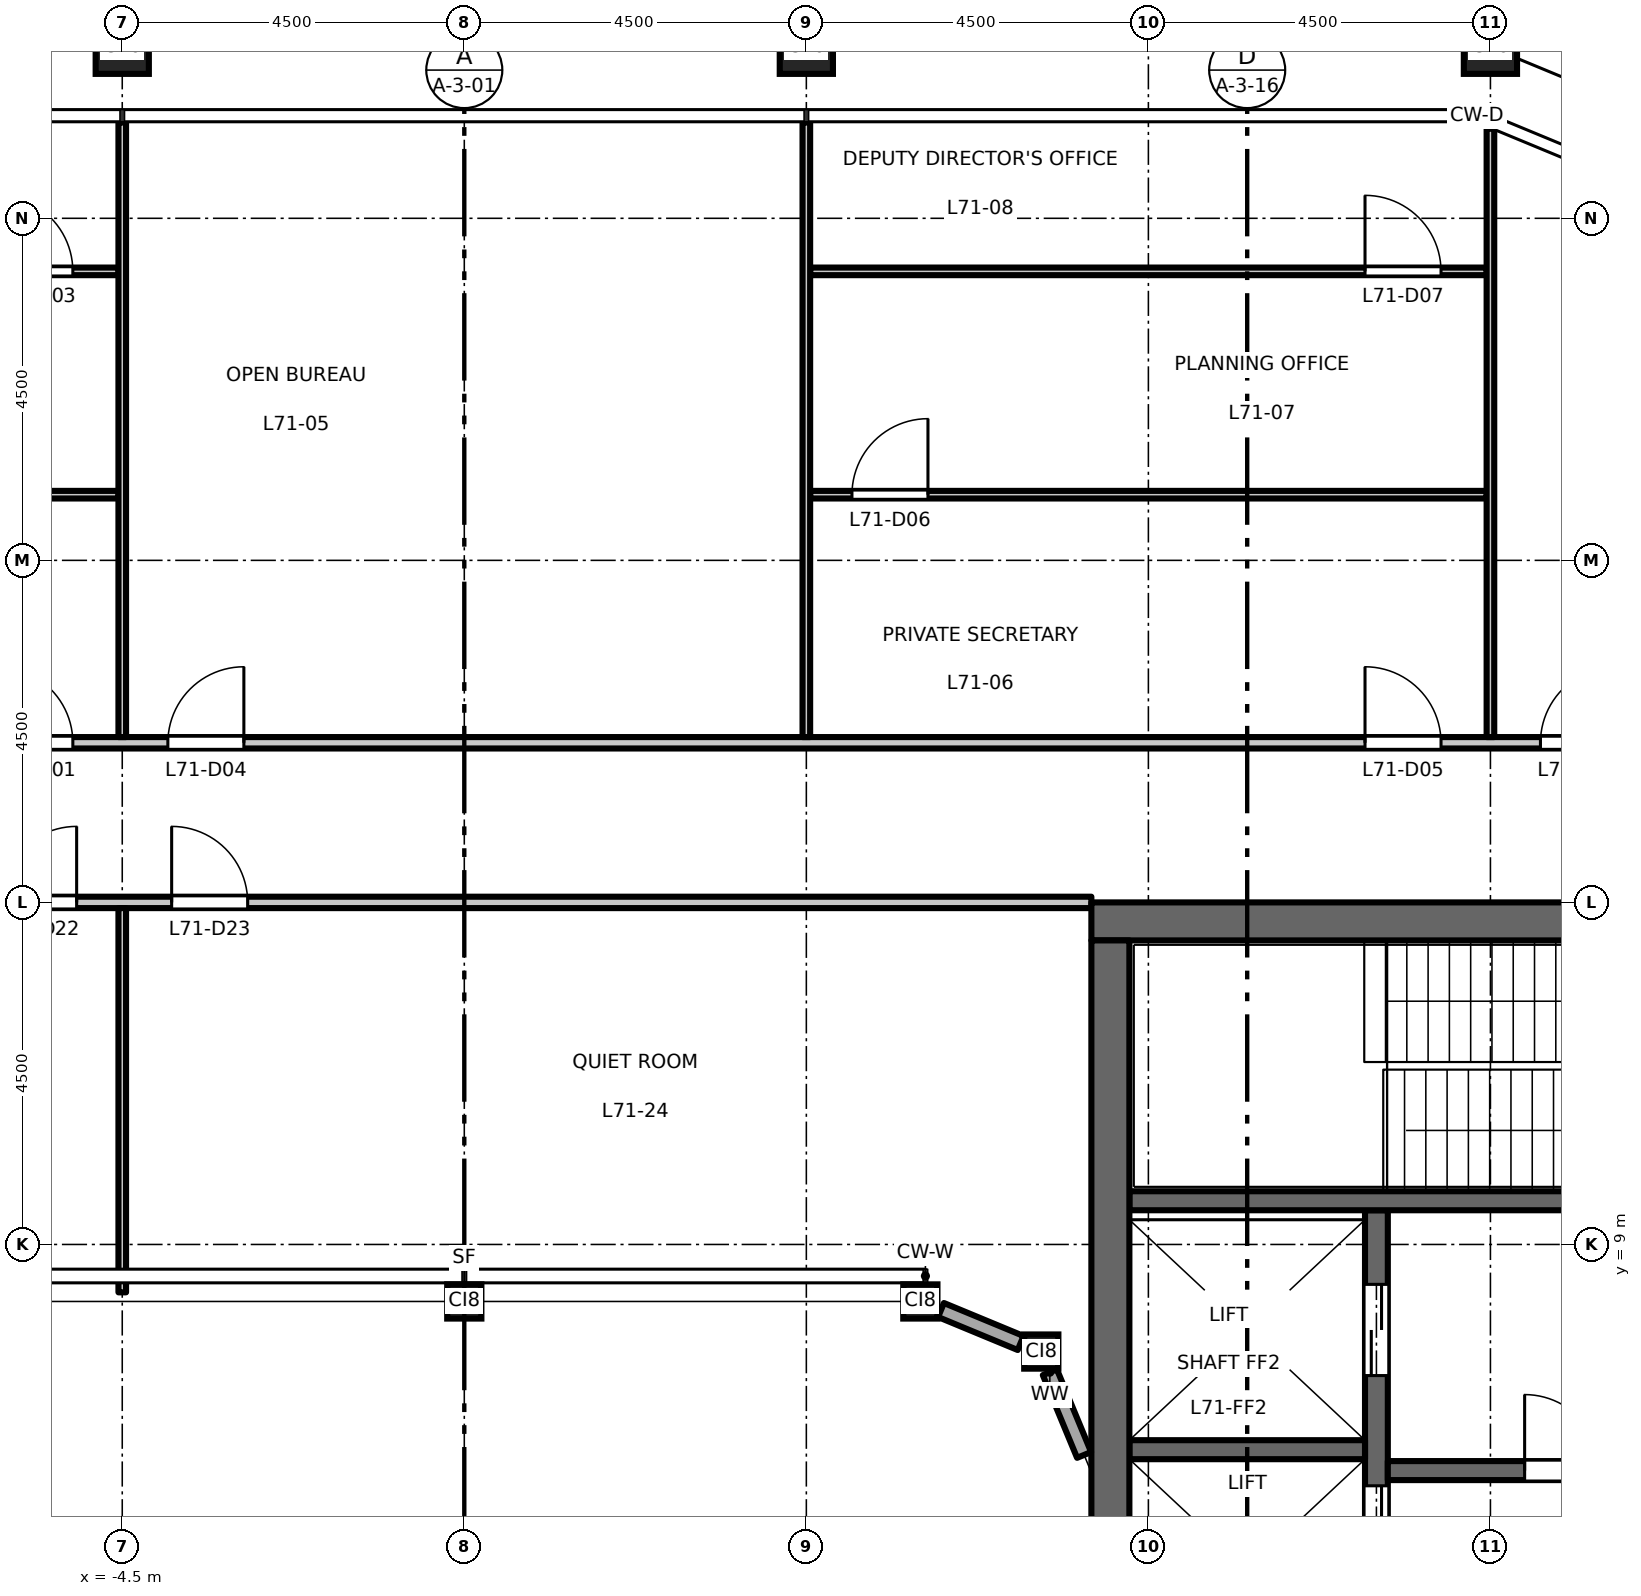
"""IFC4 building model, lengths in metres.
Left out: names, types, materials, properties, quantities, classifications, styles, units other than length and angle.
Written with IfcOpenShell. Run it as: python <this file> out.ifc"""

import sys

from ifc_helpers import new_model, si_unit, direction, frame, frame_2d, origin, origin_2d, place, context, subcontext, project, spatial, rectangle, hollow_rectangle, extrude, element, fill, save


model = new_model("IFC4")
c1 = context("Model", 3, precision=1e-05, world=origin(), true_north=direction((0.0, 1.0)))
c2 = subcontext(c1, "Body", "Model", "MODEL_VIEW")
j1 = project(units=[si_unit("LENGTHUNIT", "METRE"), si_unit("PLANEANGLEUNIT", "RADIAN")], contexts=[c1])
p1 = place(None, origin())
s1 = spatial("IfcSite", under=j1, at=p1, CompositionType="ELEMENT")
p2 = place(p1, origin())
s2 = spatial("IfcBuilding", under=s1, at=p2, CompositionType="ELEMENT")
p3 = place(p2, frame((0.0, 0.0, 330.2)))
s3 = spatial("IfcBuildingStorey", under=s2, at=p3, CompositionType="ELEMENT", Elevation=330.2)
for number, where, z_axis, x_axis in (
    (1, (13.5, 24.75, 0.0), (0.0, 0.0, 1.0), (1.0, 0.0, 0.0)),
    (2, (4.5, 24.75, 0.0), (0.0, 0.0, 1.0), (1.0, 0.0, 0.0)),
    (3, (-4.5, 24.75, 0.0), (0.0, 0.0, 1.0), (1.0, 0.0, 0.0)),
):
    element("IfcColumn", number, at=place(p3, frame(where, z_axis=z_axis, x_axis=x_axis)), inside=s3, PredefinedType="COLUMN", context=c2, shape_type="SweptSolid", body=[
        extrude(hollow_rectangle(XDim=0.7, YDim=0.7, WallThickness=0.036, at=origin_2d()), origin(), (0.0, 0.0, 1.0), 4.5),
    ])
for number, where, z_axis, x_axis in (
    (4, (0.0, 8.25, 0.0), (0.0, 0.0, 1.0), (1.0, 0.0, 0.0)),
    (5, (6.0, 8.25, 0.0), (0.0, 0.0, 1.0), (1.0, 0.0, 0.0)),
    (6, (7.591, 7.591, 0.0), (0.0, 0.0, 1.0), (1.0, 0.0, 0.0)),
):
    element("IfcColumn", number, at=place(p3, frame(where, z_axis=z_axis, x_axis=x_axis)), inside=s3, PredefinedType="COLUMN", context=c2, shape_type="SweptSolid", body=[
        extrude(hollow_rectangle(XDim=0.45, YDim=0.45, WallThickness=0.022, at=origin_2d()), origin(), (0.0, 0.0, 1.0), 4.5),
    ])
p4 = place(p3, frame((12.0, -9.45, 0.0), z_axis=(0.0, 0.0, 1.0), x_axis=(0.0, 1.0, 0.0)))
e7 = element("IfcWall", 7, at=p4, inside=s3, PredefinedType="SHEAR", context=c2, shape_type="SweptSolid", body=[
    extrude(rectangle(XDim=18.9, YDim=0.3, at=frame_2d((9.45, 0.0))), origin(), (0.0, 0.0, 1.0), 4.35),
])
p5 = place(p4, frame((4.725, 0.0, 0.0)))
e8 = element("IfcOpeningElement", 8, at=p5, cuts=e7, PredefinedType="OPENING", context=c2, shape_type="SweptSolid", body=[
    extrude(rectangle(XDim=1.1, YDim=2.1, at=frame_2d((0.55, 1.05))), frame((0.0, 0.16, 0.0), z_axis=(0.0, -1.0, 0.0), x_axis=(1.0, 0.0, 0.0)), (0.0, 0.0, 1.0), 0.32),
])
p6 = place(p4, frame((7.875, 0.0, 0.0)))
e9 = element("IfcOpeningElement", 9, at=p6, cuts=e7, PredefinedType="OPENING", context=c2, shape_type="SweptSolid", body=[
    extrude(rectangle(XDim=1.1, YDim=2.1, at=frame_2d((0.55, 1.05))), frame((0.0, 0.16, 0.0), z_axis=(0.0, -1.0, 0.0), x_axis=(1.0, 0.0, 0.0)), (0.0, 0.0, 1.0), 0.32),
])
p7 = place(p4, frame((11.025, 0.0, 0.0)))
e10 = element("IfcOpeningElement", 10, at=p7, cuts=e7, PredefinedType="OPENING", context=c2, shape_type="SweptSolid", body=[
    extrude(rectangle(XDim=1.1, YDim=2.1, at=frame_2d((0.55, 1.05))), frame((0.0, 0.16, 0.0), z_axis=(0.0, -1.0, 0.0), x_axis=(1.0, 0.0, 0.0)), (0.0, 0.0, 1.0), 0.32),
])
p8 = place(p4, frame((14.175, 0.0, 0.0)))
e11 = element("IfcOpeningElement", 11, at=p8, cuts=e7, PredefinedType="OPENING", context=c2, shape_type="SweptSolid", body=[
    extrude(rectangle(XDim=1.1, YDim=2.1, at=frame_2d((0.55, 1.05))), frame((0.0, 0.16, 0.0), z_axis=(0.0, -1.0, 0.0), x_axis=(1.0, 0.0, 0.0)), (0.0, 0.0, 1.0), 0.32),
])
p9 = place(p4, frame((16.725, 0.0, 0.0)))
e12 = element("IfcOpeningElement", 12, at=p9, cuts=e7, PredefinedType="OPENING", context=c2, shape_type="SweptSolid", body=[
    extrude(rectangle(XDim=1.2, YDim=2.1, at=frame_2d((0.6, 1.05))), frame((0.0, 0.16, 0.0), z_axis=(0.0, -1.0, 0.0), x_axis=(1.0, 0.0, 0.0)), (0.0, 0.0, 1.0), 0.32),
])
p10 = place(p4, frame((0.975, 0.0, 0.0)))
e13 = element("IfcOpeningElement", 13, at=p10, cuts=e7, PredefinedType="OPENING", context=c2, shape_type="SweptSolid", body=[
    extrude(rectangle(XDim=1.2, YDim=2.1, at=frame_2d((0.6, 1.05))), frame((0.0, 0.16, 0.0), z_axis=(0.0, -1.0, 0.0), x_axis=(1.0, 0.0, 0.0)), (0.0, 0.0, 1.0), 0.32),
])
p11 = place(p3, frame((12.15, 6.025, 0.0), z_axis=(0.0, 0.0, 1.0), x_axis=(1.0, 0.0, 0.0)))
e14 = element("IfcWall", 14, at=p11, inside=s3, PredefinedType="SHEAR", context=c2, shape_type="SweptSolid", body=[
    extrude(rectangle(XDim=4.6, YDim=0.25, at=frame_2d((2.3, 0.0))), origin(), (0.0, 0.0, 1.0), 4.35),
])
p12 = place(p11, frame((1.8, 0.0, 0.0)))
e15 = element("IfcOpeningElement", 15, at=p12, cuts=e14, PredefinedType="OPENING", context=c2, shape_type="SweptSolid", body=[
    extrude(rectangle(XDim=1.0, YDim=2.1, at=frame_2d((0.5, 1.05))), frame((0.0, 0.135, 0.0), z_axis=(0.0, -1.0, 0.0), x_axis=(1.0, 0.0, 0.0)), (0.0, 0.0, 1.0), 0.27),
])
p13 = place(p3, frame((8.75, 6.3, 0.0), z_axis=(0.0, 0.0, 1.0), x_axis=(1.0, 0.0, 0.0)))
e16 = element("IfcWall", 16, at=p13, inside=s3, PredefinedType="SHEAR", context=c2, shape_type="SweptSolid", body=[
    extrude(rectangle(XDim=3.1, YDim=0.25, at=frame_2d((1.55, 0.0))), origin(), (0.0, 0.0, 1.0), 4.35),
])
p14 = place(p3, frame((8.75, 9.575, 0.0), z_axis=(0.0, 0.0, 1.0), x_axis=(1.0, 0.0, 0.0)))
e17 = element("IfcWall", 17, at=p14, inside=s3, PredefinedType="SHEAR", context=c2, shape_type="SweptSolid", body=[
    extrude(rectangle(XDim=8.0, YDim=0.25, at=frame_2d((4.0, 0.0))), origin(), (0.0, 0.0, 1.0), 4.35),
])
p15 = place(p14, frame((6.65, 0.0, 0.0)))
e18 = element("IfcOpeningElement", 18, at=p15, cuts=e17, PredefinedType="OPENING", context=c2, shape_type="SweptSolid", body=[
    extrude(rectangle(XDim=1.1, YDim=2.1, at=frame_2d((0.55, 1.05))), frame((0.0, 0.135, 0.0), z_axis=(0.0, -1.0, 0.0), x_axis=(1.0, 0.0, 0.0)), (0.0, 0.0, 1.0), 0.27),
])
p16 = place(p3, frame((8.25, 13.25, 0.0), z_axis=(0.0, 0.0, 1.0), x_axis=(1.0, 0.0, 0.0)))
e19 = element("IfcWall", 19, at=p16, inside=s3, PredefinedType="SHEAR", context=c2, shape_type="SweptSolid", body=[
    extrude(rectangle(XDim=9.0, YDim=0.5, at=frame_2d((4.5, 0.0))), origin(), (0.0, 0.0, 1.0), 4.35),
])
p17 = place(p3, frame((8.5, -13.0, 0.0), z_axis=(0.0, 0.0, 1.0), x_axis=(0.0, 1.0, 0.0)))
e20 = element("IfcWall", 20, at=p17, inside=s3, PredefinedType="SHEAR", context=c2, shape_type="SweptSolid", body=[
    extrude(rectangle(XDim=26.0, YDim=0.5, at=frame_2d((13.0, 0.0))), origin(), (0.0, 0.0, 1.0), 4.35),
])
p18 = place(p3, frame((8.154, 6.231, 0.0), z_axis=(0.0, 0.0, 1.0), x_axis=(-0.382760542083, 0.92384758885, 0.0)))
e21 = element("IfcWall", 21, at=p18, inside=s3, PredefinedType="STANDARD", context=c2, shape_type="SweptSolid", body=[
    extrude(rectangle(XDim=1.178, YDim=0.2, at=frame_2d((0.589, 0.0))), origin(), (0.0, 0.0, 1.0), 4.01),
])
p19 = place(p3, frame((7.319, 7.703, 0.0), z_axis=(0.0, 0.0, 1.0), x_axis=(-0.923864661962, 0.382719331074, 0.0)))
e22 = element("IfcWall", 22, at=p19, inside=s3, PredefinedType="STANDARD", context=c2, shape_type="SweptSolid", body=[
    extrude(rectangle(XDim=1.134, YDim=0.2, at=frame_2d((0.567, 0.0))), origin(), (0.0, 0.0, 1.0), 4.01),
])
p20 = place(p3, frame((-8.25, 13.5, 0.0), z_axis=(0.0, 0.0, 1.0), x_axis=(1.0, 0.0, 0.0)))
e23 = element("IfcWall", 23, at=p20, inside=s3, PredefinedType="PARTITIONING", context=c2, shape_type="SweptSolid", body=[
    extrude(rectangle(XDim=16.5, YDim=0.15, at=frame_2d((8.25, 0.0))), origin(), (0.0, 0.0, 1.0), 4.35),
])
p21 = place(p20, frame((2.15, 0.0, 0.0)))
e24 = element("IfcOpeningElement", 24, at=p21, cuts=e23, PredefinedType="OPENING", context=c2, shape_type="SweptSolid", body=[
    extrude(rectangle(XDim=1.0, YDim=2.1, at=frame_2d((0.5, 1.05))), frame((0.0, 0.085, 0.0), z_axis=(0.0, -1.0, 0.0), x_axis=(1.0, 0.0, 0.0)), (0.0, 0.0, 1.0), 0.17),
])
p22 = place(p20, frame((4.4, 0.0, 0.0)))
e25 = element("IfcOpeningElement", 25, at=p22, cuts=e23, PredefinedType="OPENING", context=c2, shape_type="SweptSolid", body=[
    extrude(rectangle(XDim=1.0, YDim=2.1, at=frame_2d((0.5, 1.05))), frame((0.0, 0.085, 0.0), z_axis=(0.0, -1.0, 0.0), x_axis=(1.0, 0.0, 0.0)), (0.0, 0.0, 1.0), 0.17),
])
p23 = place(p3, frame((-22.808, 15.6, 0.0), z_axis=(0.0, 0.0, 1.0), x_axis=(1.0, 0.0, 0.0)))
e26 = element("IfcWall", 26, at=p23, inside=s3, PredefinedType="PARTITIONING", context=c2, shape_type="SweptSolid", body=[
    extrude(rectangle(XDim=45.616, YDim=0.15, at=frame_2d((22.808, 0.0))), origin(), (0.0, 0.0, 1.0), 4.35),
])
p24 = place(p23, frame((16.658, 0.0, 0.0)))
e27 = element("IfcOpeningElement", 27, at=p24, cuts=e26, PredefinedType="OPENING", context=c2, shape_type="SweptSolid", body=[
    extrude(rectangle(XDim=1.0, YDim=2.1, at=frame_2d((0.5, 1.05))), frame((0.0, 0.085, 0.0), z_axis=(0.0, -1.0, 0.0), x_axis=(1.0, 0.0, 0.0)), (0.0, 0.0, 1.0), 0.17),
])
p25 = place(p23, frame((18.908, 0.0, 0.0)))
e28 = element("IfcOpeningElement", 28, at=p25, cuts=e26, PredefinedType="OPENING", context=c2, shape_type="SweptSolid", body=[
    extrude(rectangle(XDim=1.0, YDim=2.1, at=frame_2d((0.5, 1.05))), frame((0.0, 0.085, 0.0), z_axis=(0.0, -1.0, 0.0), x_axis=(1.0, 0.0, 0.0)), (0.0, 0.0, 1.0), 0.17),
])
p26 = place(p23, frame((34.658, 0.0, 0.0)))
e29 = element("IfcOpeningElement", 29, at=p26, cuts=e26, PredefinedType="OPENING", context=c2, shape_type="SweptSolid", body=[
    extrude(rectangle(XDim=1.0, YDim=2.1, at=frame_2d((0.5, 1.05))), frame((0.0, 0.085, 0.0), z_axis=(0.0, -1.0, 0.0), x_axis=(1.0, 0.0, 0.0)), (0.0, 0.0, 1.0), 0.17),
])
p27 = place(p23, frame((7.658, 0.0, 0.0)))
e30 = element("IfcOpeningElement", 30, at=p27, cuts=e26, PredefinedType="OPENING", context=c2, shape_type="SweptSolid", body=[
    extrude(rectangle(XDim=1.0, YDim=2.1, at=frame_2d((0.5, 1.05))), frame((0.0, 0.085, 0.0), z_axis=(0.0, -1.0, 0.0), x_axis=(1.0, 0.0, 0.0)), (0.0, 0.0, 1.0), 0.17),
])
p28 = place(p23, frame((36.966, 0.0, 0.0)))
e31 = element("IfcOpeningElement", 31, at=p28, cuts=e26, PredefinedType="OPENING", context=c2, shape_type="SweptSolid", body=[
    extrude(rectangle(XDim=1.0, YDim=2.1, at=frame_2d((0.5, 1.05))), frame((0.0, 0.085, 0.0), z_axis=(0.0, -1.0, 0.0), x_axis=(1.0, 0.0, 0.0)), (0.0, 0.0, 1.0), 0.17),
])
p29 = place(p3, frame((-13.45, 18.864, 0.0), z_axis=(0.0, 0.0, 1.0), x_axis=(1.0, 0.0, 0.0)))
e32 = element("IfcWall", 32, at=p29, inside=s3, PredefinedType="PARTITIONING", context=c2, shape_type="SweptSolid", body=[
    extrude(rectangle(XDim=8.9, YDim=0.1, at=frame_2d((4.45, 0.0))), origin(), (0.0, 0.0, 1.0), 4.35),
])
p30 = place(p29, frame((0.55, 0.0, 0.0)))
e33 = element("IfcOpeningElement", 33, at=p30, cuts=e32, PredefinedType="OPENING", context=c2, shape_type="SweptSolid", body=[
    extrude(rectangle(XDim=1.0, YDim=2.1, at=frame_2d((0.5, 1.05))), frame((0.0, 0.06, 0.0), z_axis=(0.0, -1.0, 0.0), x_axis=(1.0, 0.0, 0.0)), (0.0, 0.0, 1.0), 0.12),
])
p31 = place(p3, frame((4.55, 18.864, 0.0), z_axis=(0.0, 0.0, 1.0), x_axis=(1.0, 0.0, 0.0)))
e34 = element("IfcWall", 34, at=p31, inside=s3, PredefinedType="PARTITIONING", context=c2, shape_type="SweptSolid", body=[
    extrude(rectangle(XDim=8.9, YDim=0.1, at=frame_2d((4.45, 0.0))), origin(), (0.0, 0.0, 1.0), 4.35),
])
p32 = place(p31, frame((0.55, 0.0, 0.0)))
e35 = element("IfcOpeningElement", 35, at=p32, cuts=e34, PredefinedType="OPENING", context=c2, shape_type="SweptSolid", body=[
    extrude(rectangle(XDim=1.0, YDim=2.1, at=frame_2d((0.5, 1.05))), frame((0.0, 0.06, 0.0), z_axis=(0.0, -1.0, 0.0), x_axis=(1.0, 0.0, 0.0)), (0.0, 0.0, 1.0), 0.12),
])
p33 = place(p3, frame((-13.45, 21.802, 0.0), z_axis=(0.0, 0.0, 1.0), x_axis=(1.0, 0.0, 0.0)))
e36 = element("IfcWall", 36, at=p33, inside=s3, PredefinedType="PARTITIONING", context=c2, shape_type="SweptSolid", body=[
    extrude(rectangle(XDim=8.9, YDim=0.1, at=frame_2d((4.45, 0.0))), origin(), (0.0, 0.0, 1.0), 4.35),
])
p34 = place(p33, frame((7.3, 0.0, 0.0)))
e37 = element("IfcOpeningElement", 37, at=p34, cuts=e36, PredefinedType="OPENING", context=c2, shape_type="SweptSolid", body=[
    extrude(rectangle(XDim=1.0, YDim=2.1, at=frame_2d((0.5, 1.05))), frame((0.0, 0.06, 0.0), z_axis=(0.0, -1.0, 0.0), x_axis=(1.0, 0.0, 0.0)), (0.0, 0.0, 1.0), 0.12),
])
p35 = place(p3, frame((4.55, 21.802, 0.0), z_axis=(0.0, 0.0, 1.0), x_axis=(1.0, 0.0, 0.0)))
e38 = element("IfcWall", 38, at=p35, inside=s3, PredefinedType="PARTITIONING", context=c2, shape_type="SweptSolid", body=[
    extrude(rectangle(XDim=8.9, YDim=0.1, at=frame_2d((4.45, 0.0))), origin(), (0.0, 0.0, 1.0), 4.35),
])
p36 = place(p35, frame((7.3, 0.0, 0.0)))
e39 = element("IfcOpeningElement", 39, at=p36, cuts=e38, PredefinedType="OPENING", context=c2, shape_type="SweptSolid", body=[
    extrude(rectangle(XDim=1.0, YDim=2.1, at=frame_2d((0.5, 1.05))), frame((0.0, 0.06, 0.0), z_axis=(0.0, -1.0, 0.0), x_axis=(1.0, 0.0, 0.0)), (0.0, 0.0, 1.0), 0.12),
])
p37 = place(p3, frame((-4.5, 8.37, 0.0), z_axis=(0.0, 0.0, 1.0), x_axis=(0.0, 1.0, 0.0)))
e40 = element("IfcWall", 40, at=p37, inside=s3, PredefinedType="PARTITIONING", context=c2, shape_type="SweptSolid", body=[
    extrude(rectangle(XDim=5.055, YDim=0.1, at=frame_2d((2.527, 0.0))), origin(), (0.0, 0.0, 1.0), 3.65),
])
for number, where, z_axis, x_axis in (
    (41, (-4.5, 15.675, 0.0), (0.0, 0.0, 1.0), (0.0, 1.0, 0.0)),
    (42, (4.5, 15.675, 0.0), (0.0, 0.0, 1.0), (0.0, 1.0, 0.0)),
):
    element("IfcWall", number, at=place(p3, frame(where, z_axis=z_axis, x_axis=x_axis)), inside=s3, PredefinedType="PARTITIONING", context=c2, shape_type="SweptSolid", body=[
        extrude(rectangle(XDim=8.085, YDim=0.1, at=frame_2d((4.042, 0.0))), origin(), (0.0, 0.0, 1.0), 3.65),
    ])
p38 = place(p3, frame((13.5, 15.675, 0.0), z_axis=(0.0, 0.0, 1.0), x_axis=(0.0, 1.0, 0.0)))
e43 = element("IfcWall", 43, at=p38, inside=s3, PredefinedType="PARTITIONING", context=c2, shape_type="SweptSolid", body=[
    extrude(rectangle(XDim=8.003, YDim=0.1, at=frame_2d((4.001, 0.0))), origin(), (0.0, 0.0, 1.0), 3.75),
])
p39 = place(p12, origin())
e44 = element("IfcDoor", 44, at=p39, inside=s3, OperationType="SINGLE_SWING_RIGHT", PredefinedType="DOOR", context=c2, shape_type="SweptSolid", body=[
    extrude(rectangle(XDim=1.0, YDim=2.1, at=frame_2d((0.5, 1.05))), frame((0.0, 0.025, 0.0), z_axis=(0.0, -1.0, 0.0), x_axis=(1.0, 0.0, 0.0)), (0.0, 0.0, 1.0), 0.05),
])
fill(e15, e44)
p40 = place(p8, origin())
e45 = element("IfcDoor", 45, at=p40, inside=s3, OperationType="DOUBLE_DOOR_SLIDING", PredefinedType="DOOR", context=c2, shape_type="SweptSolid", body=[
    extrude(rectangle(XDim=1.1, YDim=2.1, at=frame_2d((0.55, 1.05))), frame((0.0, 0.025, 0.0), z_axis=(0.0, -1.0, 0.0), x_axis=(1.0, 0.0, 0.0)), (0.0, 0.0, 1.0), 0.05),
])
fill(e11, e45)
p41 = place(p9, origin())
e46 = element("IfcDoor", 46, at=p41, inside=s3, OperationType="DOUBLE_DOOR_SLIDING", PredefinedType="DOOR", context=c2, shape_type="SweptSolid", body=[
    extrude(rectangle(XDim=1.2, YDim=2.1, at=frame_2d((0.6, 1.05))), frame((0.0, 0.025, 0.0), z_axis=(0.0, -1.0, 0.0), x_axis=(1.0, 0.0, 0.0)), (0.0, 0.0, 1.0), 0.05),
])
fill(e12, e46)
p42 = place(p24, origin())
e47 = element("IfcDoor", 47, at=p42, inside=s3, OperationType="SINGLE_SWING_LEFT", PredefinedType="DOOR", context=c2, shape_type="SweptSolid", body=[
    extrude(rectangle(XDim=1.0, YDim=2.1, at=frame_2d((0.5, 1.05))), frame((0.0, 0.025, 0.0), z_axis=(0.0, -1.0, 0.0), x_axis=(1.0, 0.0, 0.0)), (0.0, 0.0, 1.0), 0.05),
])
fill(e27, e47)
p43 = place(p34, origin())
e48 = element("IfcDoor", 48, at=p43, inside=s3, OperationType="SINGLE_SWING_LEFT", PredefinedType="DOOR", context=c2, shape_type="SweptSolid", body=[
    extrude(rectangle(XDim=1.0, YDim=2.1, at=frame_2d((0.5, 1.05))), frame((0.0, 0.025, 0.0), z_axis=(0.0, -1.0, 0.0), x_axis=(1.0, 0.0, 0.0)), (0.0, 0.0, 1.0), 0.05),
])
fill(e37, e48)
p44 = place(p25, origin())
e49 = element("IfcDoor", 49, at=p44, inside=s3, OperationType="SINGLE_SWING_RIGHT", PredefinedType="DOOR", context=c2, shape_type="SweptSolid", body=[
    extrude(rectangle(XDim=1.0, YDim=2.1, at=frame_2d((0.5, 1.05))), frame((0.0, 0.025, 0.0), z_axis=(0.0, -1.0, 0.0), x_axis=(1.0, 0.0, 0.0)), (0.0, 0.0, 1.0), 0.05),
])
fill(e28, e49)
p45 = place(p26, origin())
e50 = element("IfcDoor", 50, at=p45, inside=s3, OperationType="SINGLE_SWING_LEFT", PredefinedType="DOOR", context=c2, shape_type="SweptSolid", body=[
    extrude(rectangle(XDim=1.0, YDim=2.1, at=frame_2d((0.5, 1.05))), frame((0.0, 0.025, 0.0), z_axis=(0.0, -1.0, 0.0), x_axis=(1.0, 0.0, 0.0)), (0.0, 0.0, 1.0), 0.05),
])
fill(e29, e50)
p46 = place(p32, origin())
e51 = element("IfcDoor", 51, at=p46, inside=s3, OperationType="SINGLE_SWING_RIGHT", PredefinedType="DOOR", context=c2, shape_type="SweptSolid", body=[
    extrude(rectangle(XDim=1.0, YDim=2.1, at=frame_2d((0.5, 1.05))), frame((0.0, 0.025, 0.0), z_axis=(0.0, -1.0, 0.0), x_axis=(1.0, 0.0, 0.0)), (0.0, 0.0, 1.0), 0.05),
])
fill(e35, e51)
p47 = place(p36, origin())
e52 = element("IfcDoor", 52, at=p47, inside=s3, OperationType="SINGLE_SWING_LEFT", PredefinedType="DOOR", context=c2, shape_type="SweptSolid", body=[
    extrude(rectangle(XDim=1.0, YDim=2.1, at=frame_2d((0.5, 1.05))), frame((0.0, 0.025, 0.0), z_axis=(0.0, -1.0, 0.0), x_axis=(1.0, 0.0, 0.0)), (0.0, 0.0, 1.0), 0.05),
])
fill(e39, e52)
p48 = place(p28, origin())
e53 = element("IfcDoor", 53, at=p48, inside=s3, OperationType="SINGLE_SWING_RIGHT", PredefinedType="DOOR", context=c2, shape_type="SweptSolid", body=[
    extrude(rectangle(XDim=1.0, YDim=2.1, at=frame_2d((0.5, 1.05))), frame((0.0, 0.025, 0.0), z_axis=(0.0, -1.0, 0.0), x_axis=(1.0, 0.0, 0.0)), (0.0, 0.0, 1.0), 0.05),
])
fill(e31, e53)
p49 = place(p21, origin())
e54 = element("IfcDoor", 54, at=p49, inside=s3, OperationType="SINGLE_SWING_RIGHT", PredefinedType="DOOR", context=c2, shape_type="SweptSolid", body=[
    extrude(rectangle(XDim=1.0, YDim=2.1, at=frame_2d((0.5, 1.05))), frame((0.0, 0.025, 0.0), z_axis=(0.0, -1.0, 0.0), x_axis=(1.0, 0.0, 0.0)), (0.0, 0.0, 1.0), 0.05),
])
fill(e24, e54)
p50 = place(p22, origin())
e55 = element("IfcDoor", 55, at=p50, inside=s3, OperationType="SINGLE_SWING_LEFT", PredefinedType="DOOR", context=c2, shape_type="SweptSolid", body=[
    extrude(rectangle(XDim=1.0, YDim=2.1, at=frame_2d((0.5, 1.05))), frame((0.0, 0.025, 0.0), z_axis=(0.0, -1.0, 0.0), x_axis=(1.0, 0.0, 0.0)), (0.0, 0.0, 1.0), 0.05),
])
fill(e25, e55)
save(model, sys.argv[1])
